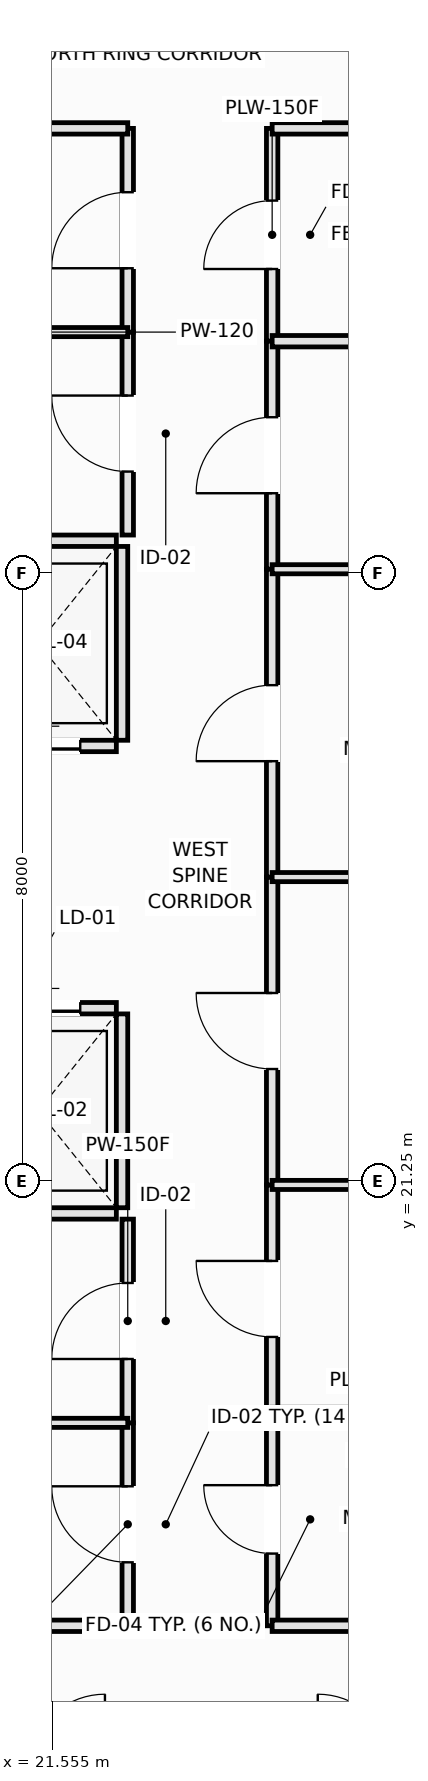
"""IFC4 building model, lengths in metres.
Left out: names, types, materials, properties, quantities, classifications, styles, units other than length and angle.
Written with IfcOpenShell. Run it as: python <this file> out.ifc"""

import sys

from ifc_helpers import new_model, si_unit, direction, frame, frame_2d, origin, place, context, subcontext, project, spatial, rectangle, extrude, element, fill, save


model = new_model("IFC4")
c1 = context("Model", 3, precision=1e-05, world=origin(), true_north=direction((0.0, 1.0)))
c2 = subcontext(c1, "Body", "Model", "MODEL_VIEW")
j1 = project(units=[si_unit("LENGTHUNIT", "METRE"), si_unit("PLANEANGLEUNIT", "RADIAN")], contexts=[c1])
p1 = place(None, origin())
s1 = spatial("IfcSite", under=j1, at=p1, CompositionType="ELEMENT")
p2 = place(p1, origin())
s2 = spatial("IfcBuilding", under=s1, at=p2, CompositionType="ELEMENT")
p3 = place(p2, frame((0.0, 0.0, 89.5)))
s3 = spatial("IfcBuildingStorey", under=s2, at=p3, CompositionType="ELEMENT", Elevation=89.5)
p4 = place(p3, frame((20.35, 20.825, 0.0), z_axis=(0.0, 0.0, 1.0), x_axis=(1.0, 0.0, 0.0)))
e1 = element("IfcWall", 1, at=p4, inside=s3, PredefinedType="PARTITIONING", context=c2, shape_type="SweptSolid", body=[
    extrude(rectangle(XDim=2.05, YDim=0.15, at=frame_2d((1.025, 0.0))), origin(), (0.0, 0.0, 1.0), 3.35),
])
p5 = place(p3, frame((20.35, 23.525, 0.0), z_axis=(0.0, 0.0, 1.0), x_axis=(1.0, 0.0, 0.0)))
e2 = element("IfcWall", 2, at=p5, inside=s3, PredefinedType="PARTITIONING", context=c2, shape_type="SweptSolid", body=[
    extrude(rectangle(XDim=2.05, YDim=0.15, at=frame_2d((1.025, 0.0))), origin(), (0.0, 0.0, 1.0), 3.35),
])
p6 = place(p5, frame((0.475, 0.0, 0.0)))
e3 = element("IfcOpeningElement", 3, at=p6, cuts=e2, PredefinedType="OPENING", context=c2, shape_type="SweptSolid", body=[
    extrude(rectangle(XDim=1.1, YDim=2.2, at=frame_2d((0.55, 1.1))), frame((0.0, 0.085, 0.0), z_axis=(0.0, -1.0, 0.0), x_axis=(1.0, 0.0, 0.0)), (0.0, 0.0, 1.0), 0.17),
])
p7 = place(p3, frame((22.475, 20.9, 0.0), z_axis=(0.0, 0.0, 1.0), x_axis=(0.0, 1.0, 0.0)))
e4 = element("IfcWall", 4, at=p7, inside=s3, PredefinedType="PARTITIONING", context=c2, shape_type="SweptSolid", body=[
    extrude(rectangle(XDim=2.55, YDim=0.15, at=frame_2d((1.275, 0.0))), origin(), (0.0, 0.0, 1.0), 3.35),
])
p8 = place(p3, frame((20.35, 26.975, 0.0), z_axis=(0.0, 0.0, 1.0), x_axis=(1.0, 0.0, 0.0)))
e5 = element("IfcWall", 5, at=p8, inside=s3, PredefinedType="PARTITIONING", context=c2, shape_type="SweptSolid", body=[
    extrude(rectangle(XDim=2.05, YDim=0.15, at=frame_2d((1.025, 0.0))), origin(), (0.0, 0.0, 1.0), 3.35),
])
p9 = place(p8, frame((0.475, 0.0, 0.0)))
e6 = element("IfcOpeningElement", 6, at=p9, cuts=e5, PredefinedType="OPENING", context=c2, shape_type="SweptSolid", body=[
    extrude(rectangle(XDim=1.1, YDim=2.2, at=frame_2d((0.55, 1.1))), frame((0.0, 0.085, 0.0), z_axis=(0.0, -1.0, 0.0), x_axis=(1.0, 0.0, 0.0)), (0.0, 0.0, 1.0), 0.17),
])
p10 = place(p3, frame((20.35, 29.675, 0.0), z_axis=(0.0, 0.0, 1.0), x_axis=(1.0, 0.0, 0.0)))
e7 = element("IfcWall", 7, at=p10, inside=s3, PredefinedType="PARTITIONING", context=c2, shape_type="SweptSolid", body=[
    extrude(rectangle(XDim=2.05, YDim=0.15, at=frame_2d((1.025, 0.0))), origin(), (0.0, 0.0, 1.0), 3.35),
])
p11 = place(p3, frame((22.475, 27.05, 0.0), z_axis=(0.0, 0.0, 1.0), x_axis=(0.0, 1.0, 0.0)))
e8 = element("IfcWall", 8, at=p11, inside=s3, PredefinedType="PARTITIONING", context=c2, shape_type="SweptSolid", body=[
    extrude(rectangle(XDim=2.55, YDim=0.15, at=frame_2d((1.275, 0.0))), origin(), (0.0, 0.0, 1.0), 3.35),
])
p12 = place(p3, frame((22.55, 15.4, 0.0), z_axis=(0.0, 0.0, 1.0), x_axis=(0.0, 1.0, 0.0)))
e9 = element("IfcWall", 9, at=p12, inside=s3, PredefinedType="PARTITIONING", context=c2, shape_type="SweptSolid", body=[
    extrude(rectangle(XDim=2.67, YDim=0.15, at=frame_2d((1.335, 0.0))), origin(), (0.0, 0.0, 1.0), 2.99),
])
p13 = place(p12, frame((0.835, 0.0, 0.0)))
e10 = element("IfcOpeningElement", 10, at=p13, cuts=e9, PredefinedType="OPENING", context=c2, shape_type="SweptSolid", body=[
    extrude(rectangle(XDim=1.0, YDim=2.15, at=frame_2d((0.5, 1.075))), frame((0.0, 0.085, 0.0), z_axis=(0.0, -1.0, 0.0), x_axis=(1.0, 0.0, 0.0)), (0.0, 0.0, 1.0), 0.17),
])
p14 = place(p3, frame((22.55, 18.07, 0.0), z_axis=(0.0, 0.0, 1.0), x_axis=(0.0, 1.0, 0.0)))
e11 = element("IfcWall", 11, at=p14, inside=s3, PredefinedType="PARTITIONING", context=c2, shape_type="SweptSolid", body=[
    extrude(rectangle(XDim=2.68, YDim=0.15, at=frame_2d((1.34, 0.0))), origin(), (0.0, 0.0, 1.0), 2.99),
])
p15 = place(p14, frame((0.84, 0.0, 0.0)))
e12 = element("IfcOpeningElement", 12, at=p15, cuts=e11, PredefinedType="OPENING", context=c2, shape_type="SweptSolid", body=[
    extrude(rectangle(XDim=1.0, YDim=2.15, at=frame_2d((0.5, 1.075))), frame((0.0, 0.085, 0.0), z_axis=(0.0, -1.0, 0.0), x_axis=(1.0, 0.0, 0.0)), (0.0, 0.0, 1.0), 0.17),
])
p16 = place(p3, frame((22.55, 29.75, 0.0), z_axis=(0.0, 0.0, 1.0), x_axis=(0.0, 1.0, 0.0)))
e13 = element("IfcWall", 13, at=p16, inside=s3, PredefinedType="PARTITIONING", context=c2, shape_type="SweptSolid", body=[
    extrude(rectangle(XDim=2.67, YDim=0.15, at=frame_2d((1.335, 0.0))), origin(), (0.0, 0.0, 1.0), 2.99),
])
p17 = place(p16, frame((0.835, 0.0, 0.0)))
e14 = element("IfcOpeningElement", 14, at=p17, cuts=e13, PredefinedType="OPENING", context=c2, shape_type="SweptSolid", body=[
    extrude(rectangle(XDim=1.0, YDim=2.15, at=frame_2d((0.5, 1.075))), frame((0.0, 0.085, 0.0), z_axis=(0.0, -1.0, 0.0), x_axis=(1.0, 0.0, 0.0)), (0.0, 0.0, 1.0), 0.17),
])
p18 = place(p3, frame((22.55, 32.42, 0.0), z_axis=(0.0, 0.0, 1.0), x_axis=(0.0, 1.0, 0.0)))
e15 = element("IfcWall", 15, at=p18, inside=s3, PredefinedType="PARTITIONING", context=c2, shape_type="SweptSolid", body=[
    extrude(rectangle(XDim=2.68, YDim=0.15, at=frame_2d((1.34, 0.0))), origin(), (0.0, 0.0, 1.0), 2.99),
])
p19 = place(p18, frame((0.84, 0.0, 0.0)))
e16 = element("IfcOpeningElement", 16, at=p19, cuts=e15, PredefinedType="OPENING", context=c2, shape_type="SweptSolid", body=[
    extrude(rectangle(XDim=1.0, YDim=2.15, at=frame_2d((0.5, 1.075))), frame((0.0, 0.085, 0.0), z_axis=(0.0, -1.0, 0.0), x_axis=(1.0, 0.0, 0.0)), (0.0, 0.0, 1.0), 0.17),
])
p20 = place(p3, frame((24.45, 15.4, 0.0), z_axis=(0.0, 0.0, 1.0), x_axis=(0.0, 1.0, 0.0)))
e17 = element("IfcWall", 17, at=p20, inside=s3, PredefinedType="PLUMBINGWALL", context=c2, shape_type="SweptSolid", body=[
    extrude(rectangle(XDim=2.8, YDim=0.15, at=frame_2d((1.4, 0.0))), origin(), (0.0, 0.0, 1.0), 3.35),
])
p21 = place(p20, frame((0.95, 0.0, 0.0)))
e18 = element("IfcOpeningElement", 18, at=p21, cuts=e17, PredefinedType="OPENING", context=c2, shape_type="SweptSolid", body=[
    extrude(rectangle(XDim=0.9, YDim=2.1, at=frame_2d((0.45, 1.05))), frame((0.0, 0.085, 0.0), z_axis=(0.0, -1.0, 0.0), x_axis=(1.0, 0.0, 0.0)), (0.0, 0.0, 1.0), 0.17),
])
p22 = place(p3, frame((24.45, 32.3, 0.0), z_axis=(0.0, 0.0, 1.0), x_axis=(0.0, 1.0, 0.0)))
e19 = element("IfcWall", 19, at=p22, inside=s3, PredefinedType="PLUMBINGWALL", context=c2, shape_type="SweptSolid", body=[
    extrude(rectangle(XDim=2.8, YDim=0.15, at=frame_2d((1.4, 0.0))), origin(), (0.0, 0.0, 1.0), 3.35),
])
p23 = place(p22, frame((0.95, 0.0, 0.0)))
e20 = element("IfcOpeningElement", 20, at=p23, cuts=e19, PredefinedType="OPENING", context=c2, shape_type="SweptSolid", body=[
    extrude(rectangle(XDim=0.9, YDim=2.1, at=frame_2d((0.45, 1.05))), frame((0.0, 0.085, 0.0), z_axis=(0.0, -1.0, 0.0), x_axis=(1.0, 0.0, 0.0)), (0.0, 0.0, 1.0), 0.17),
])
p24 = place(p3, frame((24.45, 18.2, 0.0), z_axis=(0.0, 0.0, 1.0), x_axis=(0.0, 1.0, 0.0)))
e21 = element("IfcWall", 21, at=p24, inside=s3, PredefinedType="PARTITIONING", context=c2, shape_type="SweptSolid", body=[
    extrude(rectangle(XDim=3.0, YDim=0.15, at=frame_2d((1.5, 0.0))), origin(), (0.0, 0.0, 1.0), 3.35),
])
p25 = place(p24, frame((1.0, 0.0, 0.0)))
e22 = element("IfcOpeningElement", 22, at=p25, cuts=e21, PredefinedType="OPENING", context=c2, shape_type="SweptSolid", body=[
    extrude(rectangle(XDim=1.0, YDim=2.15, at=frame_2d((0.5, 1.075))), frame((0.0, 0.085, 0.0), z_axis=(0.0, -1.0, 0.0), x_axis=(1.0, 0.0, 0.0)), (0.0, 0.0, 1.0), 0.17),
])
p26 = place(p3, frame((24.45, 29.3, 0.0), z_axis=(0.0, 0.0, 1.0), x_axis=(0.0, 1.0, 0.0)))
e23 = element("IfcWall", 23, at=p26, inside=s3, PredefinedType="PARTITIONING", context=c2, shape_type="SweptSolid", body=[
    extrude(rectangle(XDim=3.0, YDim=0.15, at=frame_2d((1.5, 0.0))), origin(), (0.0, 0.0, 1.0), 3.35),
])
p27 = place(p26, frame((1.0, 0.0, 0.0)))
e24 = element("IfcOpeningElement", 24, at=p27, cuts=e23, PredefinedType="OPENING", context=c2, shape_type="SweptSolid", body=[
    extrude(rectangle(XDim=1.0, YDim=2.15, at=frame_2d((0.5, 1.075))), frame((0.0, 0.085, 0.0), z_axis=(0.0, -1.0, 0.0), x_axis=(1.0, 0.0, 0.0)), (0.0, 0.0, 1.0), 0.17),
])
p28 = place(p3, frame((24.45, 21.2, 0.0), z_axis=(0.0, 0.0, 1.0), x_axis=(0.0, 1.0, 0.0)))
e25 = element("IfcWall", 25, at=p28, inside=s3, PredefinedType="PARTITIONING", context=c2, shape_type="SweptSolid", body=[
    extrude(rectangle(XDim=4.05, YDim=0.15, at=frame_2d((2.025, 0.0))), origin(), (0.0, 0.0, 1.0), 3.35),
])
p29 = place(p28, frame((1.525, 0.0, 0.0)))
e26 = element("IfcOpeningElement", 26, at=p29, cuts=e25, PredefinedType="OPENING", context=c2, shape_type="SweptSolid", body=[
    extrude(rectangle(XDim=1.0, YDim=2.15, at=frame_2d((0.5, 1.075))), frame((0.0, 0.085, 0.0), z_axis=(0.0, -1.0, 0.0), x_axis=(1.0, 0.0, 0.0)), (0.0, 0.0, 1.0), 0.17),
])
p30 = place(p3, frame((24.45, 25.25, 0.0), z_axis=(0.0, 0.0, 1.0), x_axis=(0.0, 1.0, 0.0)))
e27 = element("IfcWall", 27, at=p30, inside=s3, PredefinedType="PARTITIONING", context=c2, shape_type="SweptSolid", body=[
    extrude(rectangle(XDim=4.05, YDim=0.15, at=frame_2d((2.025, 0.0))), origin(), (0.0, 0.0, 1.0), 3.35),
])
p31 = place(p30, frame((1.525, 0.0, 0.0)))
e28 = element("IfcOpeningElement", 28, at=p31, cuts=e27, PredefinedType="OPENING", context=c2, shape_type="SweptSolid", body=[
    extrude(rectangle(XDim=1.0, YDim=2.15, at=frame_2d((0.5, 1.075))), frame((0.0, 0.085, 0.0), z_axis=(0.0, -1.0, 0.0), x_axis=(1.0, 0.0, 0.0)), (0.0, 0.0, 1.0), 0.17),
])
p32 = place(p3, frame((19.9, 15.4, 0.0), z_axis=(0.0, 0.0, 1.0), x_axis=(1.0, 0.0, 0.0)))
e29 = element("IfcWall", 29, at=p32, inside=s3, PredefinedType="PARTITIONING", context=c2, shape_type="SweptSolid", body=[
    extrude(rectangle(XDim=2.65, YDim=0.15, at=frame_2d((1.325, 0.0))), origin(), (0.0, 0.0, 1.0), 3.35),
])
p33 = place(p3, frame((24.45, 15.4, 0.0), z_axis=(0.0, 0.0, 1.0), x_axis=(1.0, 0.0, 0.0)))
e30 = element("IfcWall", 30, at=p33, inside=s3, PredefinedType="PLUMBINGWALL", context=c2, shape_type="SweptSolid", body=[
    extrude(rectangle(XDim=2.6, YDim=0.15, at=frame_2d((1.3, 0.0))), origin(), (0.0, 0.0, 1.0), 3.35),
])
p34 = place(p3, frame((19.9, 35.1, 0.0), z_axis=(0.0, 0.0, 1.0), x_axis=(1.0, 0.0, 0.0)))
e31 = element("IfcWall", 31, at=p34, inside=s3, PredefinedType="PARTITIONING", context=c2, shape_type="SweptSolid", body=[
    extrude(rectangle(XDim=2.65, YDim=0.15, at=frame_2d((1.325, 0.0))), origin(), (0.0, 0.0, 1.0), 3.35),
])
p35 = place(p3, frame((24.45, 35.1, 0.0), z_axis=(0.0, 0.0, 1.0), x_axis=(1.0, 0.0, 0.0)))
e32 = element("IfcWall", 32, at=p35, inside=s3, PredefinedType="PLUMBINGWALL", context=c2, shape_type="SweptSolid", body=[
    extrude(rectangle(XDim=2.6, YDim=0.15, at=frame_2d((1.3, 0.0))), origin(), (0.0, 0.0, 1.0), 3.35),
])
for number, where, z_axis, x_axis in (
    (33, (19.9, 18.07, 0.0), (0.0, 0.0, 1.0), (1.0, 0.0, 0.0)),
    (34, (19.9, 32.42, 0.0), (0.0, 0.0, 1.0), (1.0, 0.0, 0.0)),
):
    element("IfcWall", number, at=place(p3, frame(where, z_axis=z_axis, x_axis=x_axis)), inside=s3, PredefinedType="PARTITIONING", context=c2, shape_type="SweptSolid", body=[
        extrude(rectangle(XDim=2.65, YDim=0.12, at=frame_2d((1.325, 0.0))), origin(), (0.0, 0.0, 1.0), 3.35),
    ])
for number, where, z_axis, x_axis in (
    (35, (24.45, 18.2, 0.0), (0.0, 0.0, 1.0), (1.0, 0.0, 0.0)),
    (36, (24.45, 32.3, 0.0), (0.0, 0.0, 1.0), (1.0, 0.0, 0.0)),
):
    element("IfcWall", number, at=place(p3, frame(where, z_axis=z_axis, x_axis=x_axis)), inside=s3, PredefinedType="PLUMBINGWALL", context=c2, shape_type="SweptSolid", body=[
        extrude(rectangle(XDim=2.6, YDim=0.15, at=frame_2d((1.3, 0.0))), origin(), (0.0, 0.0, 1.0), 3.35),
    ])
p36 = place(p3, frame((24.45, 21.2, 0.0), z_axis=(0.0, 0.0, 1.0), x_axis=(1.0, 0.0, 0.0)))
e37 = element("IfcWall", 37, at=p36, inside=s3, PredefinedType="PARTITIONING", context=c2, shape_type="SweptSolid", body=[
    extrude(rectangle(XDim=4.95, YDim=0.12, at=frame_2d((2.475, 0.0))), origin(), (0.0, 0.0, 1.0), 3.35),
])
p37 = place(p3, frame((24.45, 29.3, 0.0), z_axis=(0.0, 0.0, 1.0), x_axis=(1.0, 0.0, 0.0)))
e38 = element("IfcWall", 38, at=p37, inside=s3, PredefinedType="PARTITIONING", context=c2, shape_type="SweptSolid", body=[
    extrude(rectangle(XDim=3.05, YDim=0.12, at=frame_2d((1.525, 0.0))), origin(), (0.0, 0.0, 1.0), 3.35),
])
p38 = place(p3, frame((24.45, 25.25, 0.0), z_axis=(0.0, 0.0, 1.0), x_axis=(1.0, 0.0, 0.0)))
e39 = element("IfcWall", 39, at=p38, inside=s3, PredefinedType="PARTITIONING", context=c2, shape_type="SweptSolid", body=[
    extrude(rectangle(XDim=3.05, YDim=0.12, at=frame_2d((1.525, 0.0))), origin(), (0.0, 0.0, 1.0), 2.7),
])
p39 = place(p6, origin())
e40 = element("IfcDoor", 40, at=p39, inside=s3, OperationType="DOUBLE_DOOR_SLIDING", PredefinedType="DOOR", context=c2, shape_type="SweptSolid", body=[
    extrude(rectangle(XDim=1.1, YDim=2.2, at=frame_2d((0.55, 1.1))), frame((0.0, 0.025, 0.0), z_axis=(0.0, -1.0, 0.0), x_axis=(1.0, 0.0, 0.0)), (0.0, 0.0, 1.0), 0.05),
])
fill(e3, e40)
p40 = place(p9, origin())
e41 = element("IfcDoor", 41, at=p40, inside=s3, OperationType="DOUBLE_DOOR_SLIDING", PredefinedType="DOOR", context=c2, shape_type="SweptSolid", body=[
    extrude(rectangle(XDim=1.1, YDim=2.2, at=frame_2d((0.55, 1.1))), frame((0.0, 0.025, 0.0), z_axis=(0.0, -1.0, 0.0), x_axis=(1.0, 0.0, 0.0)), (0.0, 0.0, 1.0), 0.05),
])
fill(e6, e41)
p41 = place(p13, origin())
e42 = element("IfcDoor", 42, at=p41, inside=s3, OperationType="SINGLE_SWING_RIGHT", PredefinedType="DOOR", context=c2, shape_type="SweptSolid", body=[
    extrude(rectangle(XDim=1.0, YDim=2.15, at=frame_2d((0.5, 1.075))), frame((0.0, 0.025, 0.0), z_axis=(0.0, -1.0, 0.0), x_axis=(1.0, 0.0, 0.0)), (0.0, 0.0, 1.0), 0.05),
])
fill(e10, e42)
p42 = place(p15, origin())
e43 = element("IfcDoor", 43, at=p42, inside=s3, OperationType="SINGLE_SWING_LEFT", PredefinedType="DOOR", context=c2, shape_type="SweptSolid", body=[
    extrude(rectangle(XDim=1.0, YDim=2.15, at=frame_2d((0.5, 1.075))), frame((0.0, 0.025, 0.0), z_axis=(0.0, -1.0, 0.0), x_axis=(1.0, 0.0, 0.0)), (0.0, 0.0, 1.0), 0.05),
])
fill(e12, e43)
p43 = place(p17, origin())
e44 = element("IfcDoor", 44, at=p43, inside=s3, OperationType="SINGLE_SWING_RIGHT", PredefinedType="DOOR", context=c2, shape_type="SweptSolid", body=[
    extrude(rectangle(XDim=1.0, YDim=2.15, at=frame_2d((0.5, 1.075))), frame((0.0, 0.025, 0.0), z_axis=(0.0, -1.0, 0.0), x_axis=(1.0, 0.0, 0.0)), (0.0, 0.0, 1.0), 0.05),
])
fill(e14, e44)
p44 = place(p19, origin())
e45 = element("IfcDoor", 45, at=p44, inside=s3, OperationType="SINGLE_SWING_LEFT", PredefinedType="DOOR", context=c2, shape_type="SweptSolid", body=[
    extrude(rectangle(XDim=1.0, YDim=2.15, at=frame_2d((0.5, 1.075))), frame((0.0, 0.025, 0.0), z_axis=(0.0, -1.0, 0.0), x_axis=(1.0, 0.0, 0.0)), (0.0, 0.0, 1.0), 0.05),
])
fill(e16, e45)
p45 = place(p21, origin())
e46 = element("IfcDoor", 46, at=p45, inside=s3, OperationType="SINGLE_SWING_RIGHT", PredefinedType="DOOR", context=c2, shape_type="SweptSolid", body=[
    extrude(rectangle(XDim=0.9, YDim=2.1, at=frame_2d((0.45, 1.05))), frame((0.0, 0.025, 0.0), z_axis=(0.0, -1.0, 0.0), x_axis=(1.0, 0.0, 0.0)), (0.0, 0.0, 1.0), 0.05),
])
fill(e18, e46)
p46 = place(p23, origin())
e47 = element("IfcDoor", 47, at=p46, inside=s3, OperationType="SINGLE_SWING_LEFT", PredefinedType="DOOR", context=c2, shape_type="SweptSolid", body=[
    extrude(rectangle(XDim=0.9, YDim=2.1, at=frame_2d((0.45, 1.05))), frame((0.0, 0.025, 0.0), z_axis=(0.0, -1.0, 0.0), x_axis=(1.0, 0.0, 0.0)), (0.0, 0.0, 1.0), 0.05),
])
fill(e20, e47)
p47 = place(p25, origin())
e48 = element("IfcDoor", 48, at=p47, inside=s3, OperationType="SINGLE_SWING_RIGHT", PredefinedType="DOOR", context=c2, shape_type="SweptSolid", body=[
    extrude(rectangle(XDim=1.0, YDim=2.15, at=frame_2d((0.5, 1.075))), frame((0.0, 0.025, 0.0), z_axis=(0.0, -1.0, 0.0), x_axis=(1.0, 0.0, 0.0)), (0.0, 0.0, 1.0), 0.05),
])
fill(e22, e48)
p48 = place(p27, origin())
e49 = element("IfcDoor", 49, at=p48, inside=s3, OperationType="SINGLE_SWING_LEFT", PredefinedType="DOOR", context=c2, shape_type="SweptSolid", body=[
    extrude(rectangle(XDim=1.0, YDim=2.15, at=frame_2d((0.5, 1.075))), frame((0.0, 0.025, 0.0), z_axis=(0.0, -1.0, 0.0), x_axis=(1.0, 0.0, 0.0)), (0.0, 0.0, 1.0), 0.05),
])
fill(e24, e49)
p49 = place(p29, origin())
e50 = element("IfcDoor", 50, at=p49, inside=s3, OperationType="SINGLE_SWING_RIGHT", PredefinedType="DOOR", context=c2, shape_type="SweptSolid", body=[
    extrude(rectangle(XDim=1.0, YDim=2.15, at=frame_2d((0.5, 1.075))), frame((0.0, 0.025, 0.0), z_axis=(0.0, -1.0, 0.0), x_axis=(1.0, 0.0, 0.0)), (0.0, 0.0, 1.0), 0.05),
])
fill(e26, e50)
p50 = place(p31, origin())
e51 = element("IfcDoor", 51, at=p50, inside=s3, OperationType="SINGLE_SWING_LEFT", PredefinedType="DOOR", context=c2, shape_type="SweptSolid", body=[
    extrude(rectangle(XDim=1.0, YDim=2.15, at=frame_2d((0.5, 1.075))), frame((0.0, 0.025, 0.0), z_axis=(0.0, -1.0, 0.0), x_axis=(1.0, 0.0, 0.0)), (0.0, 0.0, 1.0), 0.05),
])
fill(e28, e51)
save(model, sys.argv[1])
